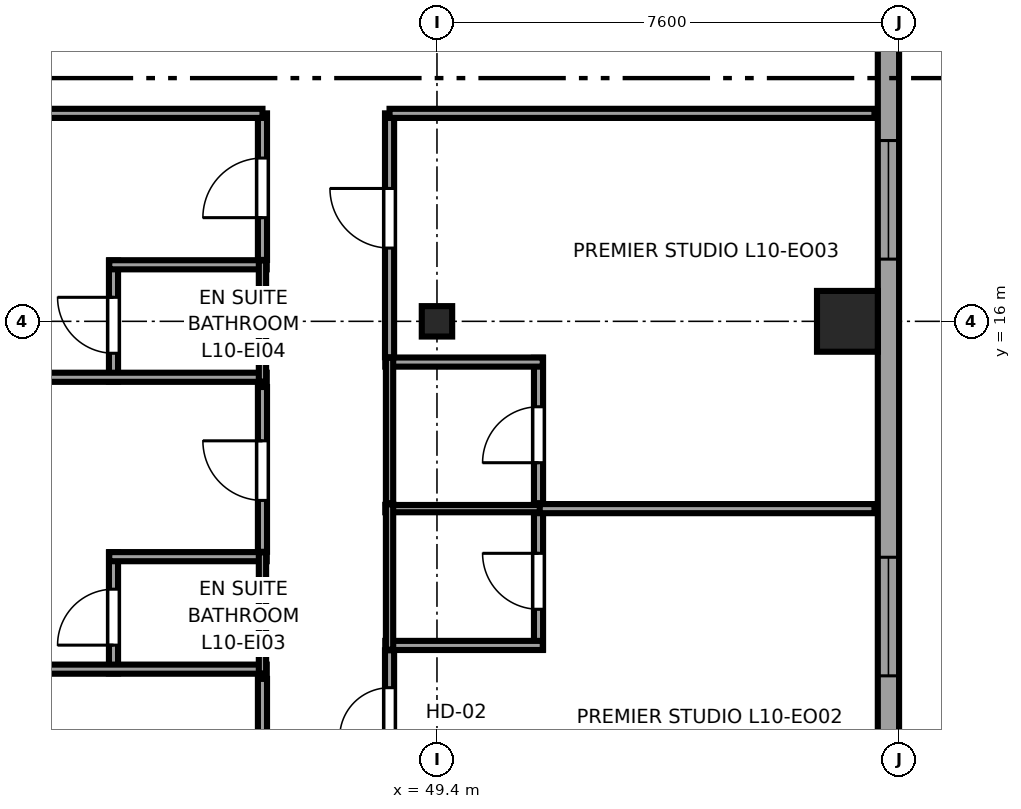
"""IFC4 building model, lengths in metres.
Left out: names, types, materials, properties, quantities, classifications, styles, units other than length and angle.
Written with IfcOpenShell. Run it as: python <this file> out.ifc"""

import sys

from ifc_helpers import new_model, si_unit, direction, frame, frame_2d, origin, origin_2d, place, context, subcontext, project, spatial, rectangle, i_section, extrude, source, transform, mapped, element, fill, save


model = new_model("IFC4")
c1 = context("Model", 3, precision=1e-05, world=origin(), true_north=direction((0.0, 1.0)))
c2 = subcontext(c1, "Body", "Model", "MODEL_VIEW")
j1 = project(units=[si_unit("LENGTHUNIT", "METRE"), si_unit("PLANEANGLEUNIT", "RADIAN")], contexts=[c1])
p1 = place(None, origin())
s1 = spatial("IfcSite", under=j1, at=p1, CompositionType="ELEMENT")
p2 = place(p1, origin())
s2 = spatial("IfcBuilding", under=s1, at=p2, CompositionType="ELEMENT")
p3 = place(p2, frame((0.0, 0.0, 46.2)))
s3 = spatial("IfcBuildingStorey", under=s2, at=p3, CompositionType="ELEMENT", Elevation=46.2)
m1 = source(origin(), c2, "Body", "SweptSolid", [
    extrude(i_section(OverallWidth=0.5, OverallDepth=0.5, WebThickness=0.028, FlangeThickness=0.045, at=origin_2d()), origin(), (0.0, 0.0, 1.0), 3.55),
])
p4 = place(p3, frame((49.4, 16.0, 0.0), z_axis=(0.0, 0.0, 1.0), x_axis=(1.0, 0.0, 0.0)))
e1 = element("IfcColumn", 1, at=p4, inside=s3, PredefinedType="COLUMN", context=c2, shape_type="MappedRepresentation", body=[
    mapped(m1, transform((0.0, 0.0, 0.0), x_axis=(1.0, 0.0, 0.0), y_axis=(0.0, 1.0, 0.0), z_axis=(0.0, 0.0, 1.0), scale=1.0)),
])
m2 = source(origin(), c2, "Body", "SweptSolid", [
    extrude(rectangle(XDim=1.0, YDim=1.0, at=origin_2d()), origin(), (0.0, 0.0, 1.0), 3.55),
])
p5 = place(p3, frame((56.15, 16.0, 0.0), z_axis=(0.0, 0.0, 1.0), x_axis=(1.0, 0.0, 0.0)))
e2 = element("IfcColumn", 2, at=p5, inside=s3, PredefinedType="COLUMN", context=c2, shape_type="MappedRepresentation", body=[
    mapped(m2, transform((0.0, 0.0, 0.0), x_axis=(1.0, 0.0, 0.0), y_axis=(0.0, 1.0, 0.0), z_axis=(0.0, 0.0, 1.0), scale=1.0)),
])
p6 = place(p3, frame((56.825, 4.617, 0.0), z_axis=(0.0, 0.0, 1.0), x_axis=(0.0, 1.0, 0.0)))
e3 = element("IfcWall", 3, at=p6, inside=s3, PredefinedType="SOLIDWALL", context=c2, shape_type="SweptSolid", body=[
    extrude(rectangle(XDim=36.766, YDim=0.35, at=frame_2d((18.383, 0.0))), origin(), (0.0, 0.0, 1.0), 3.37),
])
p7 = place(p6, frame((5.553, 0.0, 0.68)))
e4 = element("IfcOpeningElement", 4, at=p7, cuts=e3, PredefinedType="OPENING", context=c2, shape_type="SweptSolid", body=[
    extrude(rectangle(XDim=1.95, YDim=1.82, at=frame_2d((0.975, 0.91))), frame((0.0, 0.185, 0.0), z_axis=(0.0, -1.0, 0.0), x_axis=(1.0, 0.0, 0.0)), (0.0, 0.0, 1.0), 0.37),
])
p8 = place(p6, frame((12.406, 0.0, 0.68)))
e5 = element("IfcOpeningElement", 5, at=p8, cuts=e3, PredefinedType="OPENING", context=c2, shape_type="SweptSolid", body=[
    extrude(rectangle(XDim=1.95, YDim=1.82, at=frame_2d((0.975, 0.91))), frame((0.0, 0.185, 0.0), z_axis=(0.0, -1.0, 0.0), x_axis=(1.0, 0.0, 0.0)), (0.0, 0.0, 1.0), 0.37),
])
p9 = place(p6, frame((16.858, 0.0, 0.68)))
e6 = element("IfcOpeningElement", 6, at=p9, cuts=e3, PredefinedType="OPENING", context=c2, shape_type="SweptSolid", body=[
    extrude(rectangle(XDim=1.95, YDim=1.82, at=frame_2d((0.975, 0.91))), frame((0.0, 0.185, 0.0), z_axis=(0.0, -1.0, 0.0), x_axis=(1.0, 0.0, 0.0)), (0.0, 0.0, 1.0), 0.37),
])
p10 = place(p6, frame((20.81, 0.0, 0.68)))
e7 = element("IfcOpeningElement", 7, at=p10, cuts=e3, PredefinedType="OPENING", context=c2, shape_type="SweptSolid", body=[
    extrude(rectangle(XDim=1.95, YDim=1.82, at=frame_2d((0.975, 0.91))), frame((0.0, 0.185, 0.0), z_axis=(0.0, -1.0, 0.0), x_axis=(1.0, 0.0, 0.0)), (0.0, 0.0, 1.0), 0.37),
])
p11 = place(p6, frame((26.361, 0.0, 0.68)))
e8 = element("IfcOpeningElement", 8, at=p11, cuts=e3, PredefinedType="OPENING", context=c2, shape_type="SweptSolid", body=[
    extrude(rectangle(XDim=1.95, YDim=1.82, at=frame_2d((0.975, 0.91))), frame((0.0, 0.185, 0.0), z_axis=(0.0, -1.0, 0.0), x_axis=(1.0, 0.0, 0.0)), (0.0, 0.0, 1.0), 0.37),
])
p12 = place(p6, frame((30.313, 0.0, 0.68)))
e9 = element("IfcOpeningElement", 9, at=p12, cuts=e3, PredefinedType="OPENING", context=c2, shape_type="SweptSolid", body=[
    extrude(rectangle(XDim=1.95, YDim=1.82, at=frame_2d((0.975, 0.91))), frame((0.0, 0.185, 0.0), z_axis=(0.0, -1.0, 0.0), x_axis=(1.0, 0.0, 0.0)), (0.0, 0.0, 1.0), 0.37),
])
p13 = place(p6, frame((33.215, 0.0, 0.68)))
e10 = element("IfcOpeningElement", 10, at=p13, cuts=e3, PredefinedType="OPENING", context=c2, shape_type="SweptSolid", body=[
    extrude(rectangle(XDim=1.95, YDim=1.82, at=frame_2d((0.975, 0.91))), frame((0.0, 0.185, 0.0), z_axis=(0.0, -1.0, 0.0), x_axis=(1.0, 0.0, 0.0)), (0.0, 0.0, 1.0), 0.37),
])
p14 = place(p3, frame((44.08, 10.21, 0.0), z_axis=(0.0, 0.0, 1.0), x_axis=(0.0, 1.0, 0.0)))
e11 = element("IfcWall", 11, at=p14, inside=s3, PredefinedType="PARTITIONING", context=c2, shape_type="SweptSolid", body=[
    extrude(rectangle(XDim=1.99, YDim=0.15, at=frame_2d((0.995, 0.0))), origin(), (0.0, 0.0, 1.0), 3.37),
])
p15 = place(p14, frame((0.465, 0.0, 0.0)))
e12 = element("IfcOpeningElement", 12, at=p15, cuts=e11, PredefinedType="OPENING", context=c2, shape_type="SweptSolid", body=[
    extrude(rectangle(XDim=0.92, YDim=2.01, at=frame_2d((0.46, 1.005))), frame((0.0, 0.085, 0.0), z_axis=(0.0, -1.0, 0.0), x_axis=(1.0, 0.0, 0.0)), (0.0, 0.0, 1.0), 0.17),
])
p16 = place(p3, frame((34.65, 10.28, 0.0), z_axis=(0.0, 0.0, 1.0), x_axis=(1.0, 0.0, 0.0)))
e13 = element("IfcWall", 13, at=p16, inside=s3, PredefinedType="PARTITIONING", context=c2, shape_type="SweptSolid", body=[
    extrude(rectangle(XDim=11.95, YDim=0.15, at=frame_2d((5.975, 0.0))), origin(), (0.0, 0.0, 1.0), 3.37),
])
p17 = place(p3, frame((44.01, 12.13, 0.0), z_axis=(0.0, 0.0, 1.0), x_axis=(1.0, 0.0, 0.0)))
e14 = element("IfcWall", 14, at=p17, inside=s3, PredefinedType="PARTITIONING", context=c2, shape_type="SweptSolid", body=[
    extrude(rectangle(XDim=2.59, YDim=0.15, at=frame_2d((1.295, 0.0))), origin(), (0.0, 0.0, 1.0), 3.37),
])
p18 = place(p3, frame((46.53, 10.21, 0.0), z_axis=(0.0, 0.0, 1.0), x_axis=(0.0, 1.0, 0.0)))
e15 = element("IfcWall", 15, at=p18, inside=s3, PredefinedType="PLUMBINGWALL", context=c2, shape_type="SweptSolid", body=[
    extrude(rectangle(XDim=1.99, YDim=0.12, at=frame_2d((0.995, 0.0))), origin(), (0.0, 0.0, 1.0), 3.37),
])
p19 = place(p3, frame((44.08, 15.01, 0.0), z_axis=(0.0, 0.0, 1.0), x_axis=(0.0, 1.0, 0.0)))
e16 = element("IfcWall", 16, at=p19, inside=s3, PredefinedType="PARTITIONING", context=c2, shape_type="SweptSolid", body=[
    extrude(rectangle(XDim=1.99, YDim=0.15, at=frame_2d((0.995, 0.0))), origin(), (0.0, 0.0, 1.0), 3.37),
])
p20 = place(p19, frame((0.465, 0.0, 0.0)))
e17 = element("IfcOpeningElement", 17, at=p20, cuts=e16, PredefinedType="OPENING", context=c2, shape_type="SweptSolid", body=[
    extrude(rectangle(XDim=0.92, YDim=2.01, at=frame_2d((0.46, 1.005))), frame((0.0, 0.085, 0.0), z_axis=(0.0, -1.0, 0.0), x_axis=(1.0, 0.0, 0.0)), (0.0, 0.0, 1.0), 0.17),
])
p21 = place(p3, frame((34.65, 15.08, 0.0), z_axis=(0.0, 0.0, 1.0), x_axis=(1.0, 0.0, 0.0)))
e18 = element("IfcWall", 18, at=p21, inside=s3, PredefinedType="PARTITIONING", context=c2, shape_type="SweptSolid", body=[
    extrude(rectangle(XDim=11.95, YDim=0.15, at=frame_2d((5.975, 0.0))), origin(), (0.0, 0.0, 1.0), 3.37),
])
p22 = place(p3, frame((44.01, 16.93, 0.0), z_axis=(0.0, 0.0, 1.0), x_axis=(1.0, 0.0, 0.0)))
e19 = element("IfcWall", 19, at=p22, inside=s3, PredefinedType="PARTITIONING", context=c2, shape_type="SweptSolid", body=[
    extrude(rectangle(XDim=2.59, YDim=0.15, at=frame_2d((1.295, 0.0))), origin(), (0.0, 0.0, 1.0), 3.37),
])
p23 = place(p3, frame((46.53, 15.01, 0.0), z_axis=(0.0, 0.0, 1.0), x_axis=(0.0, 1.0, 0.0)))
e20 = element("IfcWall", 20, at=p23, inside=s3, PredefinedType="PLUMBINGWALL", context=c2, shape_type="SweptSolid", body=[
    extrude(rectangle(XDim=1.99, YDim=0.12, at=frame_2d((0.995, 0.0))), origin(), (0.0, 0.0, 1.0), 3.37),
])
p24 = place(p3, frame((51.07, 10.6, 0.0), z_axis=(0.0, 0.0, 1.0), x_axis=(0.0, 1.0, 0.0)))
e21 = element("IfcWall", 21, at=p24, inside=s3, PredefinedType="PARTITIONING", context=c2, shape_type="SweptSolid", body=[
    extrude(rectangle(XDim=2.39, YDim=0.15, at=frame_2d((1.195, 0.0))), origin(), (0.0, 0.0, 1.0), 3.37),
])
p25 = place(p24, frame((0.665, 0.0, 0.0)))
e22 = element("IfcOpeningElement", 22, at=p25, cuts=e21, PredefinedType="OPENING", context=c2, shape_type="SweptSolid", body=[
    extrude(rectangle(XDim=0.92, YDim=2.01, at=frame_2d((0.46, 1.005))), frame((0.0, 0.085, 0.0), z_axis=(0.0, -1.0, 0.0), x_axis=(1.0, 0.0, 0.0)), (0.0, 0.0, 1.0), 0.17),
])
p26 = place(p3, frame((48.55, 10.67, 0.0), z_axis=(0.0, 0.0, 1.0), x_axis=(1.0, 0.0, 0.0)))
e23 = element("IfcWall", 23, at=p26, inside=s3, PredefinedType="PARTITIONING", context=c2, shape_type="SweptSolid", body=[
    extrude(rectangle(XDim=2.59, YDim=0.15, at=frame_2d((1.295, 0.0))), origin(), (0.0, 0.0, 1.0), 3.37),
])
p27 = place(p3, frame((48.55, 12.92, 0.0), z_axis=(0.0, 0.0, 1.0), x_axis=(1.0, 0.0, 0.0)))
e24 = element("IfcWall", 24, at=p27, inside=s3, PredefinedType="PLUMBINGWALL", context=c2, shape_type="SweptSolid", body=[
    extrude(rectangle(XDim=2.59, YDim=0.12, at=frame_2d((1.295, 0.0))), origin(), (0.0, 0.0, 1.0), 3.37),
])
p28 = place(p3, frame((48.62, 10.6, 0.0), z_axis=(0.0, 0.0, 1.0), x_axis=(0.0, 1.0, 0.0)))
e25 = element("IfcWall", 25, at=p28, inside=s3, PredefinedType="PLUMBINGWALL", context=c2, shape_type="SweptSolid", body=[
    extrude(rectangle(XDim=2.39, YDim=0.12, at=frame_2d((1.195, 0.0))), origin(), (0.0, 0.0, 1.0), 3.37),
])
p29 = place(p3, frame((51.07, 13.01, 0.0), z_axis=(0.0, 0.0, 1.0), x_axis=(0.0, 1.0, 0.0)))
e26 = element("IfcWall", 26, at=p29, inside=s3, PredefinedType="PARTITIONING", context=c2, shape_type="SweptSolid", body=[
    extrude(rectangle(XDim=2.39, YDim=0.15, at=frame_2d((1.195, 0.0))), origin(), (0.0, 0.0, 1.0), 3.37),
])
p30 = place(p29, frame((0.665, 0.0, 0.0)))
e27 = element("IfcOpeningElement", 27, at=p30, cuts=e26, PredefinedType="OPENING", context=c2, shape_type="SweptSolid", body=[
    extrude(rectangle(XDim=0.92, YDim=2.01, at=frame_2d((0.46, 1.005))), frame((0.0, 0.085, 0.0), z_axis=(0.0, -1.0, 0.0), x_axis=(1.0, 0.0, 0.0)), (0.0, 0.0, 1.0), 0.17),
])
p31 = place(p3, frame((48.55, 15.33, 0.0), z_axis=(0.0, 0.0, 1.0), x_axis=(1.0, 0.0, 0.0)))
e28 = element("IfcWall", 28, at=p31, inside=s3, PredefinedType="PARTITIONING", context=c2, shape_type="SweptSolid", body=[
    extrude(rectangle(XDim=2.59, YDim=0.15, at=frame_2d((1.295, 0.0))), origin(), (0.0, 0.0, 1.0), 3.37),
])
p32 = place(p3, frame((48.62, 13.01, 0.0), z_axis=(0.0, 0.0, 1.0), x_axis=(0.0, 1.0, 0.0)))
e29 = element("IfcWall", 29, at=p32, inside=s3, PredefinedType="PLUMBINGWALL", context=c2, shape_type="SweptSolid", body=[
    extrude(rectangle(XDim=2.39, YDim=0.12, at=frame_2d((1.195, 0.0))), origin(), (0.0, 0.0, 1.0), 3.37),
])
p33 = place(p3, frame((46.53, 7.21, 0.0), z_axis=(0.0, 0.0, 1.0), x_axis=(0.0, 1.0, 0.0)))
e30 = element("IfcWall", 30, at=p33, inside=s3, PredefinedType="PARTITIONING", context=c2, shape_type="SweptSolid", body=[
    extrude(rectangle(XDim=2.91, YDim=0.15, at=frame_2d((1.455, 0.0))), origin(), (0.0, 0.0, 1.0), 3.37),
])
p34 = place(p33, frame((0.945, 0.0, 0.0)))
e31 = element("IfcOpeningElement", 31, at=p34, cuts=e30, PredefinedType="OPENING", context=c2, shape_type="SweptSolid", body=[
    extrude(rectangle(XDim=0.98, YDim=2.12, at=frame_2d((0.49, 1.06))), frame((0.0, 0.085, 0.0), z_axis=(0.0, -1.0, 0.0), x_axis=(1.0, 0.0, 0.0)), (0.0, 0.0, 1.0), 0.17),
])
p35 = place(p3, frame((46.53, 12.21, 0.0), z_axis=(0.0, 0.0, 1.0), x_axis=(0.0, 1.0, 0.0)))
e32 = element("IfcWall", 32, at=p35, inside=s3, PredefinedType="PARTITIONING", context=c2, shape_type="SweptSolid", body=[
    extrude(rectangle(XDim=2.71, YDim=0.15, at=frame_2d((1.355, 0.0))), origin(), (0.0, 0.0, 1.0), 3.37),
])
p36 = place(p35, frame((0.845, 0.0, 0.0)))
e33 = element("IfcOpeningElement", 33, at=p36, cuts=e32, PredefinedType="OPENING", context=c2, shape_type="SweptSolid", body=[
    extrude(rectangle(XDim=0.98, YDim=2.12, at=frame_2d((0.49, 1.06))), frame((0.0, 0.085, 0.0), z_axis=(0.0, -1.0, 0.0), x_axis=(1.0, 0.0, 0.0)), (0.0, 0.0, 1.0), 0.17),
])
p37 = place(p3, frame((46.53, 17.01, 0.0), z_axis=(0.0, 0.0, 1.0), x_axis=(0.0, 1.0, 0.0)))
e34 = element("IfcWall", 34, at=p37, inside=s3, PredefinedType="PARTITIONING", context=c2, shape_type="SweptSolid", body=[
    extrude(rectangle(XDim=2.41, YDim=0.15, at=frame_2d((1.205, 0.0))), origin(), (0.0, 0.0, 1.0), 3.37),
])
p38 = place(p37, frame((0.695, 0.0, 0.0)))
e35 = element("IfcOpeningElement", 35, at=p38, cuts=e34, PredefinedType="OPENING", context=c2, shape_type="SweptSolid", body=[
    extrude(rectangle(XDim=0.98, YDim=2.12, at=frame_2d((0.49, 1.06))), frame((0.0, 0.085, 0.0), z_axis=(0.0, -1.0, 0.0), x_axis=(1.0, 0.0, 0.0)), (0.0, 0.0, 1.0), 0.17),
])
p39 = place(p3, frame((34.65, 19.42, 0.0), z_axis=(0.0, 0.0, 1.0), x_axis=(1.0, 0.0, 0.0)))
e36 = element("IfcWall", 36, at=p39, inside=s3, PredefinedType="PARTITIONING", context=c2, shape_type="SweptSolid", body=[
    extrude(rectangle(XDim=11.88, YDim=0.15, at=frame_2d((5.94, 0.0))), origin(), (0.0, 0.0, 1.0), 3.37),
])
p40 = place(p3, frame((48.62, 6.68, 0.0), z_axis=(0.0, 0.0, 1.0), x_axis=(0.0, 1.0, 0.0)))
e37 = element("IfcWall", 37, at=p40, inside=s3, PredefinedType="PARTITIONING", context=c2, shape_type="SweptSolid", body=[
    extrude(rectangle(XDim=3.91, YDim=0.15, at=frame_2d((1.955, 0.0))), origin(), (0.0, 0.0, 1.0), 3.37),
])
p41 = place(p40, frame((2.475, 0.0, 0.0)))
e38 = element("IfcOpeningElement", 38, at=p41, cuts=e37, PredefinedType="OPENING", context=c2, shape_type="SweptSolid", body=[
    extrude(rectangle(XDim=0.82, YDim=2.01, at=frame_2d((0.41, 1.005))), frame((0.0, 0.085, 0.0), z_axis=(0.0, -1.0, 0.0), x_axis=(1.0, 0.0, 0.0)), (0.0, 0.0, 1.0), 0.17),
])
p42 = place(p3, frame((51.09, 12.92, 0.0), z_axis=(0.0, 0.0, 1.0), x_axis=(1.0, 0.0, 0.0)))
e39 = element("IfcWall", 39, at=p42, inside=s3, PredefinedType="PARTITIONING", context=c2, shape_type="SweptSolid", body=[
    extrude(rectangle(XDim=5.505, YDim=0.15, at=frame_2d((2.752, 0.0))), origin(), (0.0, 0.0, 1.0), 3.37),
])
p43 = place(p3, frame((48.62, 15.41, 0.0), z_axis=(0.0, 0.0, 1.0), x_axis=(0.0, 1.0, 0.0)))
e40 = element("IfcWall", 40, at=p43, inside=s3, PredefinedType="PARTITIONING", context=c2, shape_type="SweptSolid", body=[
    extrude(rectangle(XDim=4.01, YDim=0.15, at=frame_2d((2.005, 0.0))), origin(), (0.0, 0.0, 1.0), 3.37),
])
p44 = place(p43, frame((1.795, 0.0, 0.0)))
e41 = element("IfcOpeningElement", 41, at=p44, cuts=e40, PredefinedType="OPENING", context=c2, shape_type="SweptSolid", body=[
    extrude(rectangle(XDim=0.98, YDim=2.12, at=frame_2d((0.49, 1.06))), frame((0.0, 0.085, 0.0), z_axis=(0.0, -1.0, 0.0), x_axis=(1.0, 0.0, 0.0)), (0.0, 0.0, 1.0), 0.17),
])
p45 = place(p3, frame((48.62, 19.42, 0.0), z_axis=(0.0, 0.0, 1.0), x_axis=(1.0, 0.0, 0.0)))
e42 = element("IfcWall", 42, at=p45, inside=s3, PredefinedType="PARTITIONING", context=c2, shape_type="SweptSolid", body=[
    extrude(rectangle(XDim=7.975, YDim=0.15, at=frame_2d((3.987, 0.0))), origin(), (0.0, 0.0, 1.0), 3.37),
])
m3 = source(origin(), c2, "Body", "SweptSolid", [
    extrude(rectangle(XDim=1.95, YDim=1.82, at=frame_2d((0.975, 0.91))), frame((0.0, 0.09, 0.0), z_axis=(0.0, -1.0, 0.0), x_axis=(1.0, 0.0, 0.0)), (0.0, 0.0, 1.0), 0.06),
])
p46 = place(p7, origin())
e43 = element("IfcWindow", 43, at=p46, inside=s3, PartitioningType="DOUBLE_PANEL_VERTICAL", PredefinedType="WINDOW", context=c2, shape_type="MappedRepresentation", body=[
    mapped(m3, transform((0.0, 0.0, 0.0), x_axis=(1.0, 0.0, 0.0), y_axis=(0.0, 1.0, 0.0), z_axis=(0.0, 0.0, 1.0), scale=1.0)),
])
fill(e4, e43)
p47 = place(p8, origin())
e44 = element("IfcWindow", 44, at=p47, inside=s3, PartitioningType="DOUBLE_PANEL_VERTICAL", PredefinedType="WINDOW", context=c2, shape_type="MappedRepresentation", body=[
    mapped(m3, transform((0.0, 0.0, 0.0), x_axis=(1.0, 0.0, 0.0), y_axis=(0.0, 1.0, 0.0), z_axis=(0.0, 0.0, 1.0), scale=1.0)),
])
fill(e5, e44)
m4 = source(origin(), c2, "Body", "SweptSolid", [
    extrude(rectangle(XDim=0.92, YDim=2.01, at=frame_2d((0.46, 1.005))), frame((0.0, 0.025, 0.0), z_axis=(0.0, -1.0, 0.0), x_axis=(1.0, 0.0, 0.0)), (0.0, 0.0, 1.0), 0.05),
])
p48 = place(p15, origin())
e45 = element("IfcDoor", 45, at=p48, inside=s3, OperationType="SINGLE_SWING_LEFT", PredefinedType="DOOR", context=c2, shape_type="MappedRepresentation", body=[
    mapped(m4, transform((0.0, 0.0, 0.0), x_axis=(1.0, 0.0, 0.0), y_axis=(0.0, 1.0, 0.0), z_axis=(0.0, 0.0, 1.0), scale=1.0)),
])
fill(e12, e45)
p49 = place(p20, origin())
e46 = element("IfcDoor", 46, at=p49, inside=s3, OperationType="SINGLE_SWING_RIGHT", PredefinedType="DOOR", context=c2, shape_type="MappedRepresentation", body=[
    mapped(m4, transform((0.0, 0.0, 0.0), x_axis=(1.0, 0.0, 0.0), y_axis=(0.0, 1.0, 0.0), z_axis=(0.0, 0.0, 1.0), scale=1.0)),
])
fill(e17, e46)
p50 = place(p25, origin())
e47 = element("IfcDoor", 47, at=p50, inside=s3, OperationType="SINGLE_SWING_RIGHT", PredefinedType="DOOR", context=c2, shape_type="MappedRepresentation", body=[
    mapped(m4, transform((0.0, 0.0, 0.0), x_axis=(1.0, 0.0, 0.0), y_axis=(0.0, 1.0, 0.0), z_axis=(0.0, 0.0, 1.0), scale=1.0)),
])
fill(e22, e47)
p51 = place(p30, origin())
e48 = element("IfcDoor", 48, at=p51, inside=s3, OperationType="SINGLE_SWING_LEFT", PredefinedType="DOOR", context=c2, shape_type="MappedRepresentation", body=[
    mapped(m4, transform((0.0, 0.0, 0.0), x_axis=(1.0, 0.0, 0.0), y_axis=(0.0, 1.0, 0.0), z_axis=(0.0, 0.0, 1.0), scale=1.0)),
])
fill(e27, e48)
m5 = source(origin(), c2, "Body", "SweptSolid", [
    extrude(rectangle(XDim=0.98, YDim=2.12, at=frame_2d((0.49, 1.06))), frame((0.0, 0.025, 0.0), z_axis=(0.0, -1.0, 0.0), x_axis=(1.0, 0.0, 0.0)), (0.0, 0.0, 1.0), 0.05),
])
p52 = place(p36, origin())
e49 = element("IfcDoor", 49, at=p52, inside=s3, OperationType="SINGLE_SWING_RIGHT", PredefinedType="DOOR", context=c2, shape_type="MappedRepresentation", body=[
    mapped(m5, transform((0.0, 0.0, 0.0), x_axis=(1.0, 0.0, 0.0), y_axis=(0.0, 1.0, 0.0), z_axis=(0.0, 0.0, 1.0), scale=1.0)),
])
fill(e33, e49)
p53 = place(p38, origin())
e50 = element("IfcDoor", 50, at=p53, inside=s3, OperationType="SINGLE_SWING_LEFT", PredefinedType="DOOR", context=c2, shape_type="MappedRepresentation", body=[
    mapped(m5, transform((0.0, 0.0, 0.0), x_axis=(1.0, 0.0, 0.0), y_axis=(0.0, 1.0, 0.0), z_axis=(0.0, 0.0, 1.0), scale=1.0)),
])
fill(e35, e50)
m6 = source(origin(), c2, "Body", "SweptSolid", [
    extrude(rectangle(XDim=0.82, YDim=2.01, at=frame_2d((0.41, 1.005))), frame((0.0, 0.025, 0.0), z_axis=(0.0, -1.0, 0.0), x_axis=(1.0, 0.0, 0.0)), (0.0, 0.0, 1.0), 0.05),
])
p54 = place(p41, origin())
e51 = element("IfcDoor", 51, at=p54, inside=s3, OperationType="SINGLE_SWING_LEFT", PredefinedType="DOOR", context=c2, shape_type="MappedRepresentation", body=[
    mapped(m6, transform((0.0, 0.0, 0.0), x_axis=(1.0, 0.0, 0.0), y_axis=(0.0, 1.0, 0.0), z_axis=(0.0, 0.0, 1.0), scale=1.0)),
])
fill(e38, e51)
p55 = place(p44, origin())
e52 = element("IfcDoor", 52, at=p55, inside=s3, OperationType="SINGLE_SWING_RIGHT", PredefinedType="DOOR", context=c2, shape_type="MappedRepresentation", body=[
    mapped(m5, transform((0.0, 0.0, 0.0), x_axis=(1.0, 0.0, 0.0), y_axis=(0.0, 1.0, 0.0), z_axis=(0.0, 0.0, 1.0), scale=1.0)),
])
fill(e41, e52)
save(model, sys.argv[1])
